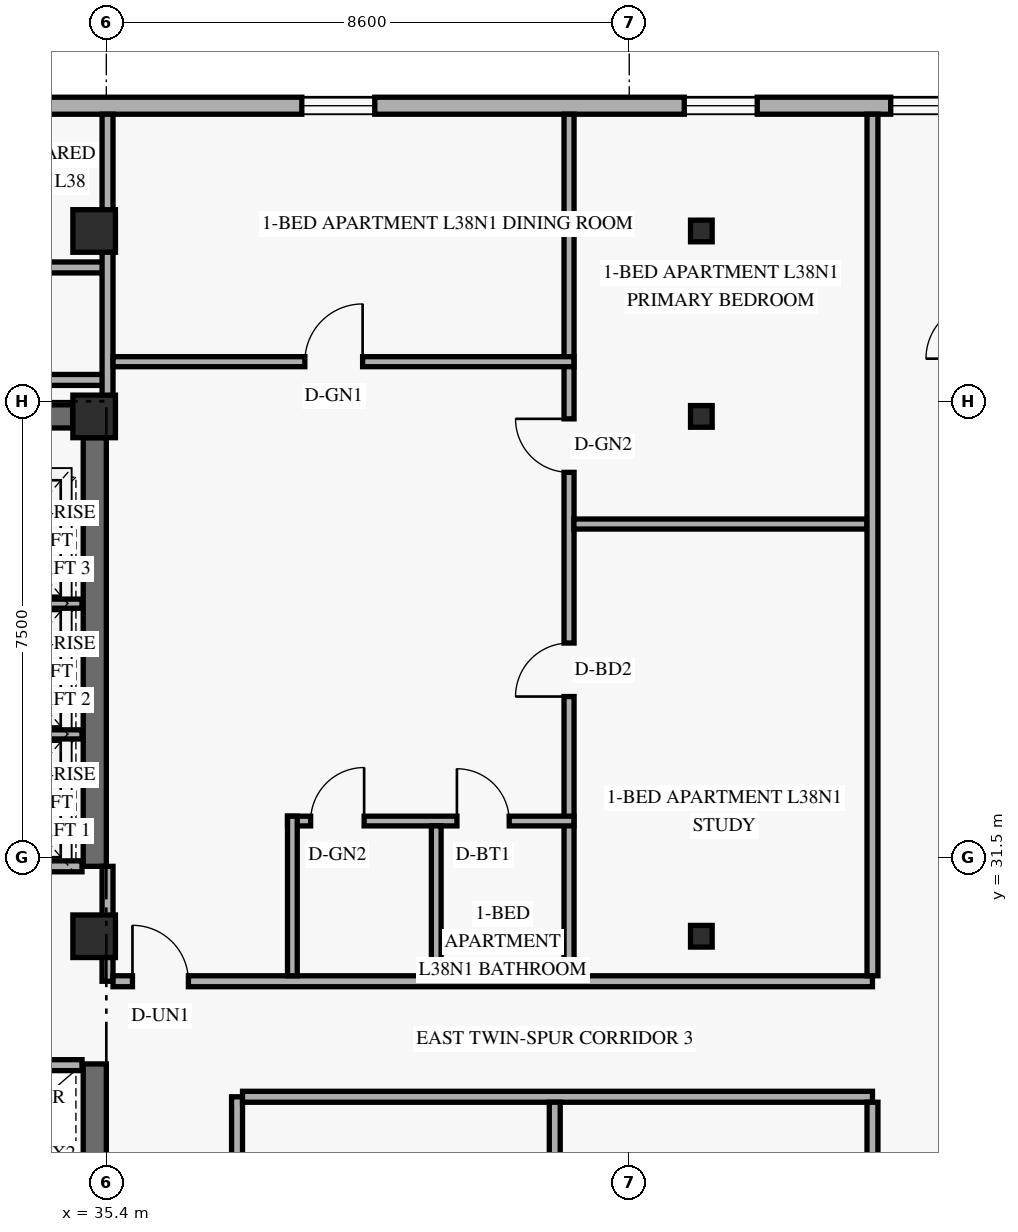
"""IFC4 building model, lengths in metres.
Left out: names, types, materials, properties, quantities, classifications, styles, units other than length and angle.
Written with IfcOpenShell. Run it as: python <this file> out.ifc"""

import sys

from ifc_helpers import new_model, si_unit, direction, frame, frame_2d, origin, origin_2d, place, context, subcontext, project, spatial, rectangle, hollow_rectangle, extrude, element, fill, save


model = new_model("IFC4")
c1 = context("Model", 3, precision=1e-05, world=origin(), true_north=direction((0.0, 1.0)))
c2 = subcontext(c1, "Body", "Model", "MODEL_VIEW")
j1 = project(units=[si_unit("LENGTHUNIT", "METRE"), si_unit("PLANEANGLEUNIT", "RADIAN")], contexts=[c1])
p1 = place(None, origin())
s1 = spatial("IfcSite", under=j1, at=p1, CompositionType="ELEMENT")
p2 = place(p1, origin())
s2 = spatial("IfcBuilding", under=s1, at=p2, CompositionType="ELEMENT")
p3 = place(p2, frame((0.0, 0.0, 148.2)))
s3 = spatial("IfcBuildingStorey", under=s2, at=p3, CompositionType="ELEMENT", Elevation=148.2)
p4 = place(p3, frame((35.21, 17.9, 0.0), z_axis=(0.0, 0.0, 1.0), x_axis=(0.0, 1.0, 0.0)))
e1 = element("IfcWall", 1, at=p4, inside=s3, PredefinedType="SHEAR", context=c2, shape_type="SweptSolid", body=[
    extrude(rectangle(XDim=10.2, YDim=0.38, at=frame_2d((5.1, 0.0))), origin(), (0.0, 0.0, 1.0), 2.748),
])
p5 = place(p3, frame((35.21, 31.35, 0.0), z_axis=(0.0, 0.0, 1.0), x_axis=(0.0, 1.0, 0.0)))
e2 = element("IfcWall", 2, at=p5, inside=s3, PredefinedType="SHEAR", context=c2, shape_type="SweptSolid", body=[
    extrude(rectangle(XDim=7.05, YDim=0.38, at=frame_2d((3.525, 0.0))), origin(), (0.0, 0.0, 1.0), 2.748),
])
p6 = place(p3, frame((24.55, 38.75, 0.0), z_axis=(0.0, 0.0, 1.0), x_axis=(1.0, 0.0, 0.0)))
e3 = element("IfcWall", 3, at=p6, inside=s3, PredefinedType="SHEAR", context=c2, shape_type="SweptSolid", body=[
    extrude(rectangle(XDim=10.3, YDim=0.38, at=frame_2d((5.15, 0.0))), origin(), (0.0, 0.0, 1.0), 3.36),
])
p7 = place(p6, frame((5.2, 0.0, 0.0)))
e4 = element("IfcOpeningElement", 4, at=p7, cuts=e3, PredefinedType="OPENING", context=c2, shape_type="SweptSolid", body=[
    extrude(rectangle(XDim=1.05, YDim=2.15, at=frame_2d((0.525, 1.075))), frame((0.0, 0.2, 0.0), z_axis=(0.0, -1.0, 0.0), x_axis=(1.0, 0.0, 0.0)), (0.0, 0.0, 1.0), 0.4),
])
for number, where, z_axis, x_axis in (
    (5, (35.2, 30.2, 0.0), (0.0, 0.0, 1.0), (1.0, 0.0, 0.0)),
    (6, (35.2, 38.75, 0.0), (0.0, 0.0, 1.0), (1.0, 0.0, 0.0)),
    (7, (35.2, 41.8, 0.0), (0.0, 0.0, 1.0), (1.0, 0.0, 0.0)),
):
    element("IfcColumn", number, at=place(p3, frame(where, z_axis=z_axis, x_axis=x_axis)), inside=s3, PredefinedType="COLUMN", context=c2, shape_type="SweptSolid", body=[
        extrude(rectangle(XDim=0.7, YDim=0.7, at=origin_2d()), origin(), (0.0, 0.0, 1.0), 3.6),
    ])
for number, where, z_axis, x_axis in (
    (8, (45.123, 30.2, 0.0), (0.035, 0.0, 0.999), (0.0, 1.0, 0.0)),
    (9, (45.123, 38.75, 0.0), (0.035, 0.0, 0.999), (0.0, 1.0, 0.0)),
    (10, (45.123, 41.8, 0.0), (0.035, 0.0, 0.999), (0.0, 1.0, 0.0)),
):
    element("IfcColumn", number, at=place(p3, frame(where, z_axis=z_axis, x_axis=x_axis)), inside=s3, PredefinedType="COLUMN", context=c2, shape_type="SweptSolid", body=[
        extrude(hollow_rectangle(XDim=0.356, YDim=0.356, WallThickness=0.016, at=origin_2d()), origin(), (0.0, 0.0, 1.0), 3.602),
    ])
p8 = place(p3, frame((54.98, 43.86, 0.0), z_axis=(0.0, 0.0, 1.0), x_axis=(-1.0, 0.0, 0.0)))
e11 = element("IfcWall", 11, at=p8, inside=s3, PredefinedType="SOLIDWALL", context=c2, shape_type="SweptSolid", body=[
    extrude(rectangle(XDim=33.76, YDim=0.28, at=frame_2d((16.88, 0.0))), origin(), (0.0, 0.0, 1.0), 3.36),
])
p9 = place(p8, frame((28.355, 0.0, 0.85)))
e12 = element("IfcOpeningElement", 12, at=p9, cuts=e11, PredefinedType="OPENING", context=c2, shape_type="SweptSolid", body=[
    extrude(rectangle(XDim=1.2, YDim=1.5, at=frame_2d((0.6, 0.75))), frame((0.0, 0.15, 0.0), z_axis=(0.0, -1.0, 0.0), x_axis=(1.0, 0.0, 0.0)), (0.0, 0.0, 1.0), 0.3),
])
p10 = place(p8, frame((21.47, 0.0, 0.85)))
e13 = element("IfcOpeningElement", 13, at=p10, cuts=e11, PredefinedType="OPENING", context=c2, shape_type="SweptSolid", body=[
    extrude(rectangle(XDim=1.2, YDim=1.5, at=frame_2d((0.6, 0.75))), frame((0.0, 0.15, 0.0), z_axis=(0.0, -1.0, 0.0), x_axis=(1.0, 0.0, 0.0)), (0.0, 0.0, 1.0), 0.3),
])
p11 = place(p8, frame((15.165, 0.0, 0.85)))
e14 = element("IfcOpeningElement", 14, at=p11, cuts=e11, PredefinedType="OPENING", context=c2, shape_type="SweptSolid", body=[
    extrude(rectangle(XDim=1.2, YDim=1.5, at=frame_2d((0.6, 0.75))), frame((0.0, 0.15, 0.0), z_axis=(0.0, -1.0, 0.0), x_axis=(1.0, 0.0, 0.0)), (0.0, 0.0, 1.0), 0.3),
])
p12 = place(p8, frame((8.875, 0.0, 0.85)))
e15 = element("IfcOpeningElement", 15, at=p12, cuts=e11, PredefinedType="OPENING", context=c2, shape_type="SweptSolid", body=[
    extrude(rectangle(XDim=1.2, YDim=1.5, at=frame_2d((0.6, 0.75))), frame((0.0, 0.15, 0.0), z_axis=(0.0, -1.0, 0.0), x_axis=(1.0, 0.0, 0.0)), (0.0, 0.0, 1.0), 0.3),
])
p13 = place(p8, frame((5.48, 0.0, 0.85)))
e16 = element("IfcOpeningElement", 16, at=p13, cuts=e11, PredefinedType="OPENING", context=c2, shape_type="SweptSolid", body=[
    extrude(rectangle(XDim=1.2, YDim=1.5, at=frame_2d((0.6, 0.75))), frame((0.0, 0.15, 0.0), z_axis=(0.0, -1.0, 0.0), x_axis=(1.0, 0.0, 0.0)), (0.0, 0.0, 1.0), 0.3),
])
p14 = place(p8, frame((1.99, 0.0, 0.85)))
e17 = element("IfcOpeningElement", 17, at=p14, cuts=e11, PredefinedType="OPENING", context=c2, shape_type="SweptSolid", body=[
    extrude(rectangle(XDim=1.2, YDim=1.5, at=frame_2d((0.6, 0.75))), frame((0.0, 0.15, 0.0), z_axis=(0.0, -1.0, 0.0), x_axis=(1.0, 0.0, 0.0)), (0.0, 0.0, 1.0), 0.3),
])
for number, where, z_axis, x_axis in (
    (18, (32.74, 28.08, 0.0), (0.0, 0.0, 1.0), (1.0, 0.0, 0.0)),
    (19, (32.74, 31.35, 0.0), (0.0, 0.0, 1.0), (1.0, 0.0, 0.0)),
):
    element("IfcWall", number, at=place(p3, frame(where, z_axis=z_axis, x_axis=x_axis)), inside=s3, PredefinedType="STANDARD", context=c2, shape_type="SweptSolid", body=[
        extrude(rectangle(XDim=2.26, YDim=0.18, at=frame_2d((1.13, 0.0))), origin(), (0.0, 0.0, 1.0), 3.36),
    ])
for number, where, z_axis, x_axis in (
    (20, (32.74, 33.52, 0.0), (0.0, 0.0, 1.0), (1.0, 0.0, 0.0)),
    (21, (32.74, 35.67, 0.0), (0.0, 0.0, 1.0), (1.0, 0.0, 0.0)),
):
    element("IfcWall", number, at=place(p3, frame(where, z_axis=z_axis, x_axis=x_axis)), inside=s3, PredefinedType="STANDARD", context=c2, shape_type="SweptSolid", body=[
        extrude(rectangle(XDim=2.26, YDim=0.15, at=frame_2d((1.13, 0.0))), origin(), (0.0, 0.0, 1.0), 3.36),
    ])
p15 = place(p3, frame((37.55, 17.28, 0.0), z_axis=(0.0, 0.0, 1.0), x_axis=(0.0, 1.0, 0.0)))
e22 = element("IfcWall", 22, at=p15, inside=s3, PredefinedType="STANDARD", context=c2, shape_type="SweptSolid", body=[
    extrude(rectangle(XDim=10.28, YDim=0.18, at=frame_2d((5.14, 0.0))), origin(), (0.0, 0.0, 1.0), 2.73),
])
p16 = place(p15, frame((5.0, 0.0, 0.0)))
e23 = element("IfcOpeningElement", 23, at=p16, cuts=e22, PredefinedType="OPENING", context=c2, shape_type="SweptSolid", body=[
    extrude(rectangle(XDim=0.92, YDim=2.15, at=frame_2d((0.46, 1.075))), frame((0.0, 0.1, 0.0), z_axis=(0.0, -1.0, 0.0), x_axis=(1.0, 0.0, 0.0)), (0.0, 0.0, 1.0), 0.2),
])
p17 = place(p3, frame((37.64, 27.56, 0.0), z_axis=(0.0, 0.0, 1.0), x_axis=(1.0, 0.0, 0.0)))
e24 = element("IfcWall", 24, at=p17, inside=s3, PredefinedType="STANDARD", context=c2, shape_type="SweptSolid", body=[
    extrude(rectangle(XDim=10.36, YDim=0.18, at=frame_2d((5.18, 0.0))), origin(), (0.0, 0.0, 1.0), 2.73),
])
p18 = place(p3, frame((35.42, 29.46, 0.0), z_axis=(0.0, 0.0, 1.0), x_axis=(0.0, 1.0, 0.0)))
e25 = element("IfcWall", 25, at=p18, inside=s3, PredefinedType="STANDARD", context=c2, shape_type="SweptSolid", body=[
    extrude(rectangle(XDim=1.89, YDim=0.18, at=frame_2d((0.945, 0.0))), origin(), (0.0, 0.0, 1.0), 2.73),
])
p19 = place(p3, frame((35.51, 29.46, 0.0), z_axis=(0.0, 0.0, 1.0), x_axis=(1.0, 0.0, 0.0)))
e26 = element("IfcWall", 26, at=p19, inside=s3, PredefinedType="STANDARD", context=c2, shape_type="SweptSolid", body=[
    extrude(rectangle(XDim=12.49, YDim=0.18, at=frame_2d((6.245, 0.0))), origin(), (0.0, 0.0, 1.0), 2.73),
])
p20 = place(p19, frame((0.32, 0.0, 0.0)))
e27 = element("IfcOpeningElement", 27, at=p20, cuts=e26, PredefinedType="OPENING", context=c2, shape_type="SweptSolid", body=[
    extrude(rectangle(XDim=0.92, YDim=2.15, at=frame_2d((0.46, 1.075))), frame((0.0, 0.1, 0.0), z_axis=(0.0, -1.0, 0.0), x_axis=(1.0, 0.0, 0.0)), (0.0, 0.0, 1.0), 0.2),
])
p21 = place(p3, frame((21.74, 41.2, 0.0), z_axis=(0.0, 0.0, 1.0), x_axis=(1.0, 0.0, 0.0)))
e28 = element("IfcWall", 28, at=p21, inside=s3, PredefinedType="STANDARD", context=c2, shape_type="SweptSolid", body=[
    extrude(rectangle(XDim=13.68, YDim=0.18, at=frame_2d((6.84, 0.0))), origin(), (0.0, 0.0, 1.0), 2.73),
])
p22 = place(p21, frame((2.95, 0.0, 0.0)))
e29 = element("IfcOpeningElement", 29, at=p22, cuts=e28, PredefinedType="OPENING", context=c2, shape_type="SweptSolid", body=[
    extrude(rectangle(XDim=0.95, YDim=2.15, at=frame_2d((0.475, 1.075))), frame((0.0, 0.1, 0.0), z_axis=(0.0, -1.0, 0.0), x_axis=(1.0, 0.0, 0.0)), (0.0, 0.0, 1.0), 0.2),
])
p23 = place(p21, frame((10.11, 0.0, 0.0)))
e30 = element("IfcOpeningElement", 30, at=p23, cuts=e28, PredefinedType="OPENING", context=c2, shape_type="SweptSolid", body=[
    extrude(rectangle(XDim=0.95, YDim=2.15, at=frame_2d((0.475, 1.075))), frame((0.0, 0.1, 0.0), z_axis=(0.0, -1.0, 0.0), x_axis=(1.0, 0.0, 0.0)), (0.0, 0.0, 1.0), 0.2),
])
p24 = place(p3, frame((23.85, 39.35, 0.0), z_axis=(0.0, 0.0, 1.0), x_axis=(1.0, 0.0, 0.0)))
e31 = element("IfcWall", 31, at=p24, inside=s3, PredefinedType="STANDARD", context=c2, shape_type="SweptSolid", body=[
    extrude(rectangle(XDim=11.57, YDim=0.18, at=frame_2d((5.785, 0.0))), origin(), (0.0, 0.0, 1.0), 2.73),
])
p25 = place(p3, frame((35.42, 38.75, 0.0), z_axis=(0.0, 0.0, 1.0), x_axis=(0.0, 1.0, 0.0)))
e32 = element("IfcWall", 32, at=p25, inside=s3, PredefinedType="PARTITIONING", context=c2, shape_type="SweptSolid", body=[
    extrude(rectangle(XDim=4.97, YDim=0.18, at=frame_2d((2.485, 0.0))), origin(), (0.0, 0.0, 1.0), 2.73),
])
p26 = place(p3, frame((43.01, 29.55, 0.0), z_axis=(0.0, 0.0, 1.0), x_axis=(0.0, 1.0, 0.0)))
e33 = element("IfcWall", 33, at=p26, inside=s3, PredefinedType="PARTITIONING", context=c2, shape_type="SweptSolid", body=[
    extrude(rectangle(XDim=14.17, YDim=0.165, at=frame_2d((7.085, 0.0))), origin(), (0.0, 0.0, 1.0), 2.73),
])
p27 = place(p26, frame((4.593, 0.0, 0.0)))
e34 = element("IfcOpeningElement", 34, at=p27, cuts=e33, PredefinedType="OPENING", context=c2, shape_type="SweptSolid", body=[
    extrude(rectangle(XDim=0.88, YDim=2.14, at=frame_2d((0.44, 1.07))), frame((0.0, 0.093, 0.0), z_axis=(0.0, -1.0, 0.0), x_axis=(1.0, 0.0, 0.0)), (0.0, 0.0, 1.0), 0.185),
])
p28 = place(p26, frame((8.28, 0.0, 0.0)))
e35 = element("IfcOpeningElement", 35, at=p28, cuts=e33, PredefinedType="OPENING", context=c2, shape_type="SweptSolid", body=[
    extrude(rectangle(XDim=0.88, YDim=2.12, at=frame_2d((0.44, 1.06))), frame((0.0, 0.093, 0.0), z_axis=(0.0, -1.0, 0.0), x_axis=(1.0, 0.0, 0.0)), (0.0, 0.0, 1.0), 0.185),
])
p29 = place(p3, frame((38.38, 32.095, 0.0), z_axis=(0.0, 0.0, 1.0), x_axis=(1.0, 0.0, 0.0)))
e36 = element("IfcWall", 36, at=p29, inside=s3, PredefinedType="PLUMBINGWALL", context=c2, shape_type="SweptSolid", body=[
    extrude(rectangle(XDim=4.71, YDim=0.16, at=frame_2d((2.355, 0.0))), origin(), (0.0, 0.0, 1.0), 3.36),
])
p30 = place(p29, frame((0.38, 0.0, 0.0)))
e37 = element("IfcOpeningElement", 37, at=p30, cuts=e36, PredefinedType="OPENING", context=c2, shape_type="SweptSolid", body=[
    extrude(rectangle(XDim=0.88, YDim=2.12, at=frame_2d((0.44, 1.06))), frame((0.0, 0.09, 0.0), z_axis=(0.0, -1.0, 0.0), x_axis=(1.0, 0.0, 0.0)), (0.0, 0.0, 1.0), 0.18),
])
p31 = place(p29, frame((2.786, 0.0, 0.0)))
e38 = element("IfcOpeningElement", 38, at=p31, cuts=e36, PredefinedType="OPENING", context=c2, shape_type="SweptSolid", body=[
    extrude(rectangle(XDim=0.86, YDim=2.12, at=frame_2d((0.43, 1.06))), frame((0.0, 0.09, 0.0), z_axis=(0.0, -1.0, 0.0), x_axis=(1.0, 0.0, 0.0)), (0.0, 0.0, 1.0), 0.18),
])
p32 = place(p3, frame((38.46, 29.55, 0.0), z_axis=(0.0, 0.0, 1.0), x_axis=(0.0, 1.0, 0.0)))
e39 = element("IfcWall", 39, at=p32, inside=s3, PredefinedType="PLUMBINGWALL", context=c2, shape_type="SweptSolid", body=[
    extrude(rectangle(XDim=2.625, YDim=0.16, at=frame_2d((1.312, 0.0))), origin(), (0.0, 0.0, 1.0), 2.73),
])
p33 = place(p3, frame((40.826, 29.55, 0.0), z_axis=(0.0, 0.0, 1.0), x_axis=(0.0, 1.0, 0.0)))
e40 = element("IfcWall", 40, at=p33, inside=s3, PredefinedType="PLUMBINGWALL", context=c2, shape_type="SweptSolid", body=[
    extrude(rectangle(XDim=2.465, YDim=0.16, at=frame_2d((1.232, 0.0))), origin(), (0.0, 0.0, 1.0), 2.73),
])
p34 = place(p3, frame((35.51, 39.65, 0.0), z_axis=(0.0, 0.0, 1.0), x_axis=(1.0, 0.0, 0.0)))
e41 = element("IfcWall", 41, at=p34, inside=s3, PredefinedType="PARTITIONING", context=c2, shape_type="SweptSolid", body=[
    extrude(rectangle(XDim=7.58, YDim=0.165, at=frame_2d((3.79, 0.0))), origin(), (0.0, 0.0, 1.0), 3.36),
])
p35 = place(p34, frame((3.155, 0.0, 0.0)))
e42 = element("IfcOpeningElement", 42, at=p35, cuts=e41, PredefinedType="OPENING", context=c2, shape_type="SweptSolid", body=[
    extrude(rectangle(XDim=0.95, YDim=2.15, at=frame_2d((0.475, 1.075))), frame((0.0, 0.093, 0.0), z_axis=(0.0, -1.0, 0.0), x_axis=(1.0, 0.0, 0.0)), (0.0, 0.0, 1.0), 0.185),
])
p36 = place(p3, frame((43.09, 36.98, 0.0), z_axis=(0.0, 0.0, 1.0), x_axis=(1.0, 0.0, 0.0)))
e43 = element("IfcWall", 43, at=p36, inside=s3, PredefinedType="PARTITIONING", context=c2, shape_type="SweptSolid", body=[
    extrude(rectangle(XDim=4.82, YDim=0.165, at=frame_2d((2.41, 0.0))), origin(), (0.0, 0.0, 1.0), 2.73),
])
p37 = place(p3, frame((42.775, 17.37, 0.0), z_axis=(0.0, 0.0, 1.0), x_axis=(0.0, 1.0, 0.0)))
e44 = element("IfcWall", 44, at=p37, inside=s3, PredefinedType="PARTITIONING", context=c2, shape_type="SweptSolid", body=[
    extrude(rectangle(XDim=10.1, YDim=0.18, at=frame_2d((5.05, 0.0))), origin(), (0.0, 0.0, 1.0), 2.73),
])
p38 = place(p3, frame((48.0, 17.37, 0.0), z_axis=(0.0, 0.0, 1.0), x_axis=(0.0, 1.0, 0.0)))
e45 = element("IfcWall", 45, at=p38, inside=s3, PredefinedType="STANDARD", context=c2, shape_type="SweptSolid", body=[
    extrude(rectangle(XDim=10.1, YDim=0.18, at=frame_2d((5.05, 0.0))), origin(), (0.0, 0.0, 1.0), 2.73),
])
p39 = place(p3, frame((48.0, 29.55, 0.0), z_axis=(0.0, 0.0, 1.0), x_axis=(0.0, 1.0, 0.0)))
e46 = element("IfcWall", 46, at=p39, inside=s3, PredefinedType="STANDARD", context=c2, shape_type="SweptSolid", body=[
    extrude(rectangle(XDim=14.17, YDim=0.18, at=frame_2d((7.085, 0.0))), origin(), (0.0, 0.0, 1.0), 2.73),
])
p40 = place(p11, origin())
e47 = element("IfcWindow", 47, at=p40, inside=s3, PartitioningType="SINGLE_PANEL", PredefinedType="WINDOW", context=c2, shape_type="SweptSolid", body=[
    extrude(rectangle(XDim=1.2, YDim=1.5, at=frame_2d((0.6, 0.75))), frame((0.0, 0.03, 0.0), z_axis=(0.0, -1.0, 0.0), x_axis=(1.0, 0.0, 0.0)), (0.0, 0.0, 1.0), 0.06),
])
fill(e14, e47)
p41 = place(p12, origin())
e48 = element("IfcWindow", 48, at=p41, inside=s3, PartitioningType="SINGLE_PANEL", PredefinedType="WINDOW", context=c2, shape_type="SweptSolid", body=[
    extrude(rectangle(XDim=1.2, YDim=1.5, at=frame_2d((0.6, 0.75))), frame((0.0, 0.03, 0.0), z_axis=(0.0, -1.0, 0.0), x_axis=(1.0, 0.0, 0.0)), (0.0, 0.0, 1.0), 0.06),
])
fill(e15, e48)
p42 = place(p13, origin())
e49 = element("IfcWindow", 49, at=p42, inside=s3, PartitioningType="SINGLE_PANEL", PredefinedType="WINDOW", context=c2, shape_type="SweptSolid", body=[
    extrude(rectangle(XDim=1.2, YDim=1.5, at=frame_2d((0.6, 0.75))), frame((0.0, 0.03, 0.0), z_axis=(0.0, -1.0, 0.0), x_axis=(1.0, 0.0, 0.0)), (0.0, 0.0, 1.0), 0.06),
])
fill(e16, e49)
p43 = place(p35, origin())
e50 = element("IfcDoor", 50, at=p43, inside=s3, OperationType="SINGLE_SWING_RIGHT", PredefinedType="DOOR", context=c2, shape_type="SweptSolid", body=[
    extrude(rectangle(XDim=0.95, YDim=2.15, at=frame_2d((0.475, 1.075))), frame((0.0, 0.025, 0.0), z_axis=(0.0, -1.0, 0.0), x_axis=(1.0, 0.0, 0.0)), (0.0, 0.0, 1.0), 0.05),
])
fill(e42, e50)
p44 = place(p20, origin())
e51 = element("IfcDoor", 51, at=p44, inside=s3, OperationType="SINGLE_SWING_LEFT", PredefinedType="DOOR", context=c2, shape_type="SweptSolid", body=[
    extrude(rectangle(XDim=0.92, YDim=2.15, at=frame_2d((0.46, 1.075))), frame((0.0, 0.025, 0.0), z_axis=(0.0, -1.0, 0.0), x_axis=(1.0, 0.0, 0.0)), (0.0, 0.0, 1.0), 0.05),
])
fill(e27, e51)
p45 = place(p30, origin())
e52 = element("IfcDoor", 52, at=p45, inside=s3, OperationType="SINGLE_SWING_RIGHT", PredefinedType="DOOR", context=c2, shape_type="SweptSolid", body=[
    extrude(rectangle(XDim=0.88, YDim=2.12, at=frame_2d((0.44, 1.06))), frame((0.0, 0.025, 0.0), z_axis=(0.0, -1.0, 0.0), x_axis=(1.0, 0.0, 0.0)), (0.0, 0.0, 1.0), 0.05),
])
fill(e37, e52)
p46 = place(p31, origin())
e53 = element("IfcDoor", 53, at=p46, inside=s3, OperationType="SINGLE_SWING_LEFT", PredefinedType="DOOR", context=c2, shape_type="SweptSolid", body=[
    extrude(rectangle(XDim=0.86, YDim=2.12, at=frame_2d((0.43, 1.06))), frame((0.0, 0.025, 0.0), z_axis=(0.0, -1.0, 0.0), x_axis=(1.0, 0.0, 0.0)), (0.0, 0.0, 1.0), 0.05),
])
fill(e38, e53)
p47 = place(p27, origin())
e54 = element("IfcDoor", 54, at=p47, inside=s3, OperationType="SINGLE_SWING_LEFT", PredefinedType="DOOR", context=c2, shape_type="SweptSolid", body=[
    extrude(rectangle(XDim=0.88, YDim=2.14, at=frame_2d((0.44, 1.07))), frame((0.0, 0.025, 0.0), z_axis=(0.0, -1.0, 0.0), x_axis=(1.0, 0.0, 0.0)), (0.0, 0.0, 1.0), 0.05),
])
fill(e34, e54)
p48 = place(p28, origin())
e55 = element("IfcDoor", 55, at=p48, inside=s3, OperationType="SINGLE_SWING_RIGHT", PredefinedType="DOOR", context=c2, shape_type="SweptSolid", body=[
    extrude(rectangle(XDim=0.88, YDim=2.12, at=frame_2d((0.44, 1.06))), frame((0.0, 0.025, 0.0), z_axis=(0.0, -1.0, 0.0), x_axis=(1.0, 0.0, 0.0)), (0.0, 0.0, 1.0), 0.05),
])
fill(e35, e55)
save(model, sys.argv[1])
